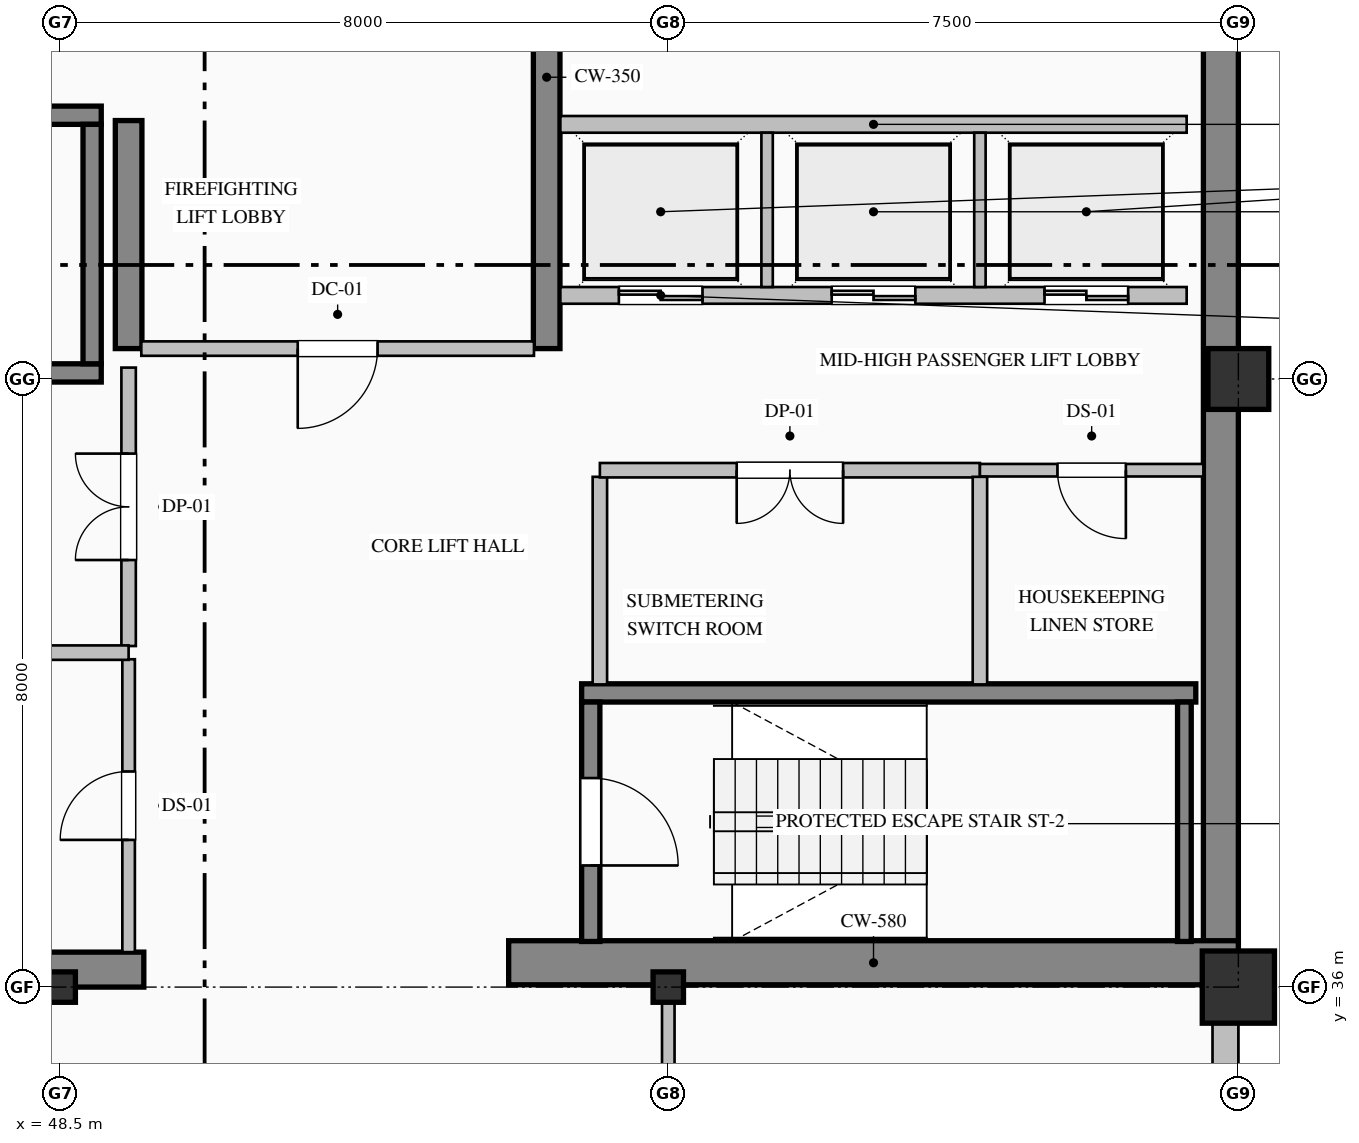
"""IFC4 building model, lengths in metres.
Left out: names, types, materials, properties, quantities, classifications, styles, units other than length and angle.
Written with IfcOpenShell. Run it as: python <this file> out.ifc"""

import sys

from ifc_helpers import new_model, si_unit, direction, frame, frame_2d, origin, origin_2d, place, context, subcontext, project, spatial, rectangle, hollow_rectangle, i_section, extrude, element, fill, save


model = new_model("IFC4")
c1 = context("Model", 3, precision=1e-05, world=origin(), true_north=direction((0.0, 1.0)))
c2 = subcontext(c1, "Body", "Model", "MODEL_VIEW")
j1 = project(units=[si_unit("LENGTHUNIT", "METRE"), si_unit("PLANEANGLEUNIT", "RADIAN")], contexts=[c1])
p1 = place(None, origin())
s1 = spatial("IfcSite", under=j1, at=p1, CompositionType="ELEMENT")
p2 = place(p1, origin())
s2 = spatial("IfcBuilding", under=s1, at=p2, CompositionType="ELEMENT")
p3 = place(p2, frame((0.0, 0.0, 261.8)))
s3 = spatial("IfcBuildingStorey", under=s2, at=p3, CompositionType="ELEMENT", Elevation=261.8)
p4 = place(p3, frame((63.77, 36.32, 0.0), z_axis=(0.0, 0.0, 1.0), x_axis=(0.0, 1.0, 0.0)))
e1 = element("IfcWall", 1, at=p4, inside=s3, PredefinedType="SHEAR", context=c2, shape_type="SweptSolid", body=[
    extrude(rectangle(XDim=15.22, YDim=0.46, at=frame_2d((7.61, 0.0))), origin(), (0.0, 0.0, 1.0), 3.775),
])
p5 = place(p3, frame((40.5, 36.23, 0.0), z_axis=(0.0, 0.0, 1.0), x_axis=(1.0, 0.0, 0.0)))
e2 = element("IfcWall", 2, at=p5, inside=s3, PredefinedType="SHEAR", context=c2, shape_type="SweptSolid", body=[
    extrude(rectangle(XDim=9.1, YDim=0.46, at=frame_2d((4.55, 0.0))), origin(), (0.0, 0.0, 1.0), 3.775),
])
p6 = place(p3, frame((54.4, 36.32, 0.0), z_axis=(0.0, 0.0, 1.0), x_axis=(1.0, 0.0, 0.0)))
e3 = element("IfcWall", 3, at=p6, inside=s3, PredefinedType="SHEAR", context=c2, shape_type="SweptSolid", body=[
    extrude(rectangle(XDim=9.6, YDim=0.58, at=frame_2d((4.8, 0.0))), origin(), (0.0, 0.0, 1.0), 4.0),
])
p7 = place(p3, frame((49.4, 44.4, 0.0), z_axis=(0.0, 0.0, 1.0), x_axis=(0.0, 1.0, 0.0)))
e4 = element("IfcWall", 4, at=p7, inside=s3, PredefinedType="SHEAR", context=c2, shape_type="SweptSolid", body=[
    extrude(rectangle(XDim=3.0, YDim=0.35, at=frame_2d((1.5, 0.0))), origin(), (0.0, 0.0, 1.0), 3.775),
])
p8 = place(p3, frame((54.9, 44.4, 0.0), z_axis=(0.0, 0.0, 1.0), x_axis=(0.0, 1.0, 0.0)))
e5 = element("IfcWall", 5, at=p8, inside=s3, PredefinedType="SHEAR", context=c2, shape_type="SweptSolid", body=[
    extrude(rectangle(XDim=7.14, YDim=0.35, at=frame_2d((3.57, 0.0))), origin(), (0.0, 0.0, 1.0), 3.775),
])
for number, where, z_axis, x_axis in (
    (6, (48.5, 36.0, 0.0), (0.0, 0.0, 1.0), (1.0, 0.0, 0.0)),
    (7, (56.5, 36.0, 0.0), (0.0, 0.0, 1.0), (1.0, 0.0, 0.0)),
):
    element("IfcColumn", number, at=place(p3, frame(where, z_axis=z_axis, x_axis=x_axis)), inside=s3, PredefinedType="COLUMN", context=c2, shape_type="SweptSolid", body=[
        extrude(i_section(OverallWidth=0.4, OverallDepth=0.4, WebThickness=0.013, FlangeThickness=0.021, FilletRadius=0.022, at=origin_2d()), origin(), (0.0, 0.0, 1.0), 4.0),
    ])
p9 = place(p3, frame((64.0, 36.0, 0.0), z_axis=(0.0, 0.0, 1.0), x_axis=(1.0, 0.0, 0.0)))
e8 = element("IfcColumn", 8, at=p9, inside=s3, PredefinedType="COLUMN", context=c2, shape_type="SweptSolid", body=[
    extrude(hollow_rectangle(XDim=0.95, YDim=0.95, WallThickness=0.036, at=origin_2d()), origin(), (0.0, 0.0, 1.0), 4.0),
])
p10 = place(p3, frame((64.0, 44.0, 0.0), z_axis=(0.0, 0.0, 1.0), x_axis=(1.0, 0.0, 0.0)))
e9 = element("IfcColumn", 9, at=p10, inside=s3, PredefinedType="COLUMN", context=c2, shape_type="SweptSolid", body=[
    extrude(hollow_rectangle(XDim=0.8, YDim=0.8, WallThickness=0.032, at=origin_2d()), origin(), (0.0, 0.0, 1.0), 4.0),
])
p11 = place(p3, frame((63.83, 36.05, 0.0), z_axis=(0.0, 0.0, 1.0), x_axis=(0.0, -1.0, 0.0)))
e10 = element("IfcWall", 10, at=p11, inside=s3, PredefinedType="SOLIDWALL", context=c2, shape_type="SweptSolid", body=[
    extrude(rectangle(XDim=19.55, YDim=0.34, at=frame_2d((9.775, 0.0))), origin(), (0.0, 0.0, 1.0), 3.325),
])
p12 = place(p11, frame((3.0, 0.0, 0.9)))
e11 = element("IfcOpeningElement", 11, at=p12, cuts=e10, PredefinedType="OPENING", context=c2, shape_type="SweptSolid", body=[
    extrude(rectangle(XDim=1.2, YDim=1.85, at=frame_2d((0.6, 0.925))), frame((0.0, 0.18, 0.0), z_axis=(0.0, -1.0, 0.0), x_axis=(1.0, 0.0, 0.0)), (0.0, 0.0, 1.0), 0.36),
])
p13 = place(p11, frame((10.05, 0.0, 0.7)))
e12 = element("IfcOpeningElement", 12, at=p13, cuts=e10, PredefinedType="OPENING", context=c2, shape_type="SweptSolid", body=[
    extrude(rectangle(XDim=1.5, YDim=2.4, at=frame_2d((0.75, 1.2))), frame((0.0, 0.18, 0.0), z_axis=(0.0, -1.0, 0.0), x_axis=(1.0, 0.0, 0.0)), (0.0, 0.0, 1.0), 0.36),
])
p14 = place(p11, frame((13.8, 0.0, 0.9)))
e13 = element("IfcOpeningElement", 13, at=p14, cuts=e10, PredefinedType="OPENING", context=c2, shape_type="SweptSolid", body=[
    extrude(rectangle(XDim=1.2, YDim=1.85, at=frame_2d((0.6, 0.925))), frame((0.0, 0.18, 0.0), z_axis=(0.0, -1.0, 0.0), x_axis=(1.0, 0.0, 0.0)), (0.0, 0.0, 1.0), 0.36),
])
for number, where, z_axis, x_axis in (
    (14, (40.96, 47.47, 0.0), (0.0, 0.0, 1.0), (1.0, 0.0, 0.0)),
    (15, (49.04, 44.08, 0.0), (0.0, 0.0, 1.0), (-1.0, 0.0, 0.0)),
):
    element("IfcWall", number, at=place(p3, frame(where, z_axis=z_axis, x_axis=x_axis)), inside=s3, PredefinedType="SOLIDWALL", context=c2, shape_type="SweptSolid", body=[
        extrude(rectangle(XDim=8.08, YDim=0.24, at=frame_2d((4.04, 0.0))), origin(), (0.0, 0.0, 1.0), 4.0),
    ])
p15 = place(p3, frame((48.92, 44.2, 0.0), z_axis=(0.0, 0.0, 1.0), x_axis=(0.0, 1.0, 0.0)))
e16 = element("IfcWall", 16, at=p15, inside=s3, PredefinedType="SOLIDWALL", context=c2, shape_type="SweptSolid", body=[
    extrude(rectangle(XDim=3.15, YDim=0.24, at=frame_2d((1.575, 0.0))), origin(), (0.0, 0.0, 1.0), 4.0),
])
p16 = place(p3, frame((55.36, 39.87, 0.0), z_axis=(0.0, 0.0, 1.0), x_axis=(1.0, 0.0, 0.0)))
e17 = element("IfcWall", 17, at=p16, inside=s3, PredefinedType="SOLIDWALL", context=c2, shape_type="SweptSolid", body=[
    extrude(rectangle(XDim=8.08, YDim=0.24, at=frame_2d((4.04, 0.0))), origin(), (0.0, 0.0, 1.0), 4.0),
])
p17 = place(p3, frame((55.48, 39.75, 0.0), z_axis=(0.0, 0.0, 1.0), x_axis=(0.0, -1.0, 0.0)))
e18 = element("IfcWall", 18, at=p17, inside=s3, PredefinedType="SOLIDWALL", context=c2, shape_type="SweptSolid", body=[
    extrude(rectangle(XDim=3.15, YDim=0.24, at=frame_2d((1.575, 0.0))), origin(), (0.0, 0.0, 1.0), 4.0),
])
p18 = place(p17, frame((1.0, 0.0, 0.0)))
e19 = element("IfcOpeningElement", 19, at=p18, cuts=e18, PredefinedType="OPENING", context=c2, shape_type="SweptSolid", body=[
    extrude(rectangle(XDim=1.15, YDim=2.2, at=frame_2d((0.575, 1.1))), frame((0.0, 0.13, 0.0), z_axis=(0.0, -1.0, 0.0), x_axis=(1.0, 0.0, 0.0)), (0.0, 0.0, 1.0), 0.26),
])
p19 = place(p3, frame((63.29, 36.6, 0.0), z_axis=(0.0, 0.0, 1.0), x_axis=(0.0, 1.0, 0.0)))
e20 = element("IfcWall", 20, at=p19, inside=s3, PredefinedType="SOLIDWALL", context=c2, shape_type="SweptSolid", body=[
    extrude(rectangle(XDim=3.15, YDim=0.18, at=frame_2d((1.575, 0.0))), origin(), (0.0, 0.0, 1.0), 4.0),
])
p20 = place(p3, frame((63.32, 45.1, 0.0), z_axis=(0.0, 0.0, 1.0), x_axis=(-1.0, 0.0, 0.0)))
e21 = element("IfcWall", 21, at=p20, inside=s3, PredefinedType="PARTITIONING", context=c2, shape_type="SweptSolid", body=[
    extrude(rectangle(XDim=8.24, YDim=0.22, at=frame_2d((4.12, 0.0))), origin(), (0.0, 0.0, 1.0), 3.775),
])
p21 = place(p20, frame((6.37, 0.0, 0.0)))
e22 = element("IfcOpeningElement", 22, at=p21, cuts=e21, PredefinedType="OPENING", context=c2, shape_type="SweptSolid", body=[
    extrude(rectangle(XDim=1.1, YDim=2.2, at=frame_2d((0.55, 1.1))), frame((0.0, 0.12, 0.0), z_axis=(0.0, -1.0, 0.0), x_axis=(1.0, 0.0, 0.0)), (0.0, 0.0, 1.0), 0.24),
])
p22 = place(p20, frame((3.57, 0.0, 0.0)))
e23 = element("IfcOpeningElement", 23, at=p22, cuts=e21, PredefinedType="OPENING", context=c2, shape_type="SweptSolid", body=[
    extrude(rectangle(XDim=1.1, YDim=2.2, at=frame_2d((0.55, 1.1))), frame((0.0, 0.12, 0.0), z_axis=(0.0, -1.0, 0.0), x_axis=(1.0, 0.0, 0.0)), (0.0, 0.0, 1.0), 0.24),
])
p23 = place(p20, frame((0.77, 0.0, 0.0)))
e24 = element("IfcOpeningElement", 24, at=p23, cuts=e21, PredefinedType="OPENING", context=c2, shape_type="SweptSolid", body=[
    extrude(rectangle(XDim=1.1, YDim=2.2, at=frame_2d((0.55, 1.1))), frame((0.0, 0.12, 0.0), z_axis=(0.0, -1.0, 0.0), x_axis=(1.0, 0.0, 0.0)), (0.0, 0.0, 1.0), 0.24),
])
p24 = place(p3, frame((55.08, 47.35, 0.0), z_axis=(0.0, 0.0, 1.0), x_axis=(1.0, 0.0, 0.0)))
e25 = element("IfcWall", 25, at=p24, inside=s3, PredefinedType="PARTITIONING", context=c2, shape_type="SweptSolid", body=[
    extrude(rectangle(XDim=8.24, YDim=0.22, at=frame_2d((4.12, 0.0))), origin(), (0.0, 0.0, 1.0), 3.775),
])
for number, where, z_axis, x_axis in (
    (26, (57.8, 45.21, 0.0), (0.0, 0.0, 1.0), (0.0, 1.0, 0.0)),
    (27, (60.6, 45.21, 0.0), (0.0, 0.0, 1.0), (0.0, 1.0, 0.0)),
):
    element("IfcWall", number, at=place(p3, frame(where, z_axis=z_axis, x_axis=x_axis)), inside=s3, PredefinedType="PARTITIONING", context=c2, shape_type="SweptSolid", body=[
        extrude(rectangle(XDim=2.03, YDim=0.15, at=frame_2d((1.015, 0.0))), origin(), (0.0, 0.0, 1.0), 3.775),
    ])
p25 = place(p3, frame((54.733, 44.4, 0.0), z_axis=(0.0, 0.0, 1.0), x_axis=(-1.0, 0.0, 0.0)))
e28 = element("IfcWall", 28, at=p25, inside=s3, PredefinedType="PARTITIONING", context=c2, shape_type="SweptSolid", body=[
    extrude(rectangle(XDim=5.166, YDim=0.19, at=frame_2d((2.583, 0.0))), origin(), (0.0, 0.0, 1.0), 3.775),
])
p26 = place(p25, frame((2.058, 0.0, 0.0)))
e29 = element("IfcOpeningElement", 29, at=p26, cuts=e28, PredefinedType="OPENING", context=c2, shape_type="SweptSolid", body=[
    extrude(rectangle(XDim=1.05, YDim=2.15, at=frame_2d((0.525, 1.075))), frame((0.0, 0.105, 0.0), z_axis=(0.0, -1.0, 0.0), x_axis=(1.0, 0.0, 0.0)), (0.0, 0.0, 1.0), 0.21),
])
p27 = place(p3, frame((49.4, 36.46, 0.0), z_axis=(0.0, 0.0, 1.0), x_axis=(0.0, 1.0, 0.0)))
e30 = element("IfcWall", 30, at=p27, inside=s3, PredefinedType="PARTITIONING", context=c2, shape_type="SweptSolid", body=[
    extrude(rectangle(XDim=3.853, YDim=0.165, at=frame_2d((1.927, 0.0))), origin(), (0.0, 0.0, 1.0), 3.017),
])
p28 = place(p27, frame((1.477, 0.0, 0.0)))
e31 = element("IfcOpeningElement", 31, at=p28, cuts=e30, PredefinedType="OPENING", context=c2, shape_type="SweptSolid", body=[
    extrude(rectangle(XDim=0.9, YDim=2.15, at=frame_2d((0.45, 1.075))), frame((0.0, 0.093, 0.0), z_axis=(0.0, -1.0, 0.0), x_axis=(1.0, 0.0, 0.0)), (0.0, 0.0, 1.0), 0.185),
])
p29 = place(p3, frame((49.4, 40.487, 0.0), z_axis=(0.0, 0.0, 1.0), x_axis=(0.0, 1.0, 0.0)))
e32 = element("IfcWall", 32, at=p29, inside=s3, PredefinedType="PARTITIONING", context=c2, shape_type="SweptSolid", body=[
    extrude(rectangle(XDim=3.663, YDim=0.19, at=frame_2d((1.832, 0.0))), origin(), (0.0, 0.0, 1.0), 3.017),
])
p30 = place(p29, frame((1.132, 0.0, 0.0)))
e33 = element("IfcOpeningElement", 33, at=p30, cuts=e32, PredefinedType="OPENING", context=c2, shape_type="SweptSolid", body=[
    extrude(rectangle(XDim=1.4, YDim=2.25, at=frame_2d((0.7, 1.125))), frame((0.0, 0.105, 0.0), z_axis=(0.0, -1.0, 0.0), x_axis=(1.0, 0.0, 0.0)), (0.0, 0.0, 1.0), 0.21),
])
p31 = place(p3, frame((55.6, 42.713, 0.0), z_axis=(0.0, 0.0, 1.0), x_axis=(0.0, -1.0, 0.0)))
e34 = element("IfcWall", 34, at=p31, inside=s3, PredefinedType="PARTITIONING", context=c2, shape_type="SweptSolid", body=[
    extrude(rectangle(XDim=2.731, YDim=0.19, at=frame_2d((1.365, 0.0))), origin(), (0.0, 0.0, 1.0), 3.775),
])
p32 = place(p3, frame((40.96, 40.4, 0.0), z_axis=(0.0, 0.0, 1.0), x_axis=(1.0, 0.0, 0.0)))
e35 = element("IfcWall", 35, at=p32, inside=s3, PredefinedType="PARTITIONING", context=c2, shape_type="SweptSolid", body=[
    extrude(rectangle(XDim=8.44, YDim=0.19, at=frame_2d((4.22, 0.0))), origin(), (0.0, 0.0, 1.0), 3.775),
])
p33 = place(p3, frame((60.6, 42.8, 0.0), z_axis=(0.0, 0.0, 1.0), x_axis=(-1.0, 0.0, 0.0)))
e36 = element("IfcWall", 36, at=p33, inside=s3, PredefinedType="PARTITIONING", context=c2, shape_type="SweptSolid", body=[
    extrude(rectangle(XDim=5.0, YDim=0.19, at=frame_2d((2.5, 0.0))), origin(), (0.0, 0.0, 1.0), 3.775),
])
p34 = place(p33, frame((1.8, 0.0, 0.0)))
e37 = element("IfcOpeningElement", 37, at=p34, cuts=e36, PredefinedType="OPENING", context=c2, shape_type="SweptSolid", body=[
    extrude(rectangle(XDim=1.4, YDim=2.25, at=frame_2d((0.7, 1.125))), frame((0.0, 0.105, 0.0), z_axis=(0.0, -1.0, 0.0), x_axis=(1.0, 0.0, 0.0)), (0.0, 0.0, 1.0), 0.21),
])
p35 = place(p3, frame((63.54, 42.8, 0.0), z_axis=(0.0, 0.0, 1.0), x_axis=(-1.0, 0.0, 0.0)))
e38 = element("IfcWall", 38, at=p35, inside=s3, PredefinedType="PARTITIONING", context=c2, shape_type="SweptSolid", body=[
    extrude(rectangle(XDim=2.94, YDim=0.165, at=frame_2d((1.47, 0.0))), origin(), (0.0, 0.0, 1.0), 3.775),
])
p36 = place(p35, frame((1.02, 0.0, 0.0)))
e39 = element("IfcOpeningElement", 39, at=p36, cuts=e38, PredefinedType="OPENING", context=c2, shape_type="SweptSolid", body=[
    extrude(rectangle(XDim=0.9, YDim=2.15, at=frame_2d((0.45, 1.075))), frame((0.0, 0.093, 0.0), z_axis=(0.0, -1.0, 0.0), x_axis=(1.0, 0.0, 0.0)), (0.0, 0.0, 1.0), 0.185),
])
p37 = place(p3, frame((60.6, 42.713, 0.0), z_axis=(0.0, 0.0, 1.0), x_axis=(0.0, -1.0, 0.0)))
e40 = element("IfcWall", 40, at=p37, inside=s3, PredefinedType="PARTITIONING", context=c2, shape_type="SweptSolid", body=[
    extrude(rectangle(XDim=2.731, YDim=0.19, at=frame_2d((1.365, 0.0))), origin(), (0.0, 0.0, 1.0), 3.775),
])
p38 = place(p3, frame((56.5, 36.0, 0.0), z_axis=(0.0, 0.0, 1.0), x_axis=(0.0, -1.0, 0.0)))
e41 = element("IfcWall", 41, at=p38, inside=s3, PredefinedType="PARTITIONING", context=c2, shape_type="SweptSolid", body=[
    extrude(rectangle(XDim=5.525, YDim=0.165, at=frame_2d((2.763, 0.0))), origin(), (0.0, 0.0, 1.0), 3.179),
])
p39 = place(p38, frame((2.263, 0.0, 0.0)))
e42 = element("IfcOpeningElement", 42, at=p39, cuts=e41, PredefinedType="OPENING", context=c2, shape_type="SweptSolid", body=[
    extrude(rectangle(XDim=1.0, YDim=2.15, at=frame_2d((0.5, 1.075))), frame((0.0, 0.093, 0.0), z_axis=(0.0, -1.0, 0.0), x_axis=(1.0, 0.0, 0.0)), (0.0, 0.0, 1.0), 0.185),
])
p40 = place(p18, origin())
e43 = element("IfcDoor", 43, at=p40, inside=s3, OperationType="SINGLE_SWING_RIGHT", PredefinedType="DOOR", context=c2, shape_type="SweptSolid", body=[
    extrude(rectangle(XDim=1.15, YDim=2.2, at=frame_2d((0.575, 1.1))), frame((0.0, 0.025, 0.0), z_axis=(0.0, -1.0, 0.0), x_axis=(1.0, 0.0, 0.0)), (0.0, 0.0, 1.0), 0.05),
])
fill(e19, e43)
p41 = place(p21, origin())
e44 = element("IfcDoor", 44, at=p41, inside=s3, OperationType="DOUBLE_DOOR_SLIDING", PredefinedType="DOOR", context=c2, shape_type="SweptSolid", body=[
    extrude(rectangle(XDim=1.1, YDim=2.2, at=frame_2d((0.55, 1.1))), frame((0.0, 0.025, 0.0), z_axis=(0.0, -1.0, 0.0), x_axis=(1.0, 0.0, 0.0)), (0.0, 0.0, 1.0), 0.05),
])
fill(e22, e44)
p42 = place(p22, origin())
e45 = element("IfcDoor", 45, at=p42, inside=s3, OperationType="DOUBLE_DOOR_SLIDING", PredefinedType="DOOR", context=c2, shape_type="SweptSolid", body=[
    extrude(rectangle(XDim=1.1, YDim=2.2, at=frame_2d((0.55, 1.1))), frame((0.0, 0.025, 0.0), z_axis=(0.0, -1.0, 0.0), x_axis=(1.0, 0.0, 0.0)), (0.0, 0.0, 1.0), 0.05),
])
fill(e23, e45)
p43 = place(p23, origin())
e46 = element("IfcDoor", 46, at=p43, inside=s3, OperationType="DOUBLE_DOOR_SLIDING", PredefinedType="DOOR", context=c2, shape_type="SweptSolid", body=[
    extrude(rectangle(XDim=1.1, YDim=2.2, at=frame_2d((0.55, 1.1))), frame((0.0, 0.025, 0.0), z_axis=(0.0, -1.0, 0.0), x_axis=(1.0, 0.0, 0.0)), (0.0, 0.0, 1.0), 0.05),
])
fill(e24, e46)
p44 = place(p26, origin())
e47 = element("IfcDoor", 47, at=p44, inside=s3, OperationType="SINGLE_SWING_RIGHT", PredefinedType="DOOR", context=c2, shape_type="SweptSolid", body=[
    extrude(rectangle(XDim=1.05, YDim=2.15, at=frame_2d((0.525, 1.075))), frame((0.0, 0.025, 0.0), z_axis=(0.0, -1.0, 0.0), x_axis=(1.0, 0.0, 0.0)), (0.0, 0.0, 1.0), 0.05),
])
fill(e29, e47)
p45 = place(p28, origin())
e48 = element("IfcDoor", 48, at=p45, inside=s3, OperationType="SINGLE_SWING_LEFT", PredefinedType="DOOR", context=c2, shape_type="SweptSolid", body=[
    extrude(rectangle(XDim=0.9, YDim=2.15, at=frame_2d((0.45, 1.075))), frame((0.0, 0.025, 0.0), z_axis=(0.0, -1.0, 0.0), x_axis=(1.0, 0.0, 0.0)), (0.0, 0.0, 1.0), 0.05),
])
fill(e31, e48)
p46 = place(p30, origin())
e49 = element("IfcDoor", 49, at=p46, inside=s3, OperationType="DOUBLE_DOOR_SINGLE_SWING", PredefinedType="DOOR", context=c2, shape_type="SweptSolid", body=[
    extrude(rectangle(XDim=1.4, YDim=2.25, at=frame_2d((0.7, 1.125))), frame((0.0, 0.025, 0.0), z_axis=(0.0, -1.0, 0.0), x_axis=(1.0, 0.0, 0.0)), (0.0, 0.0, 1.0), 0.05),
])
fill(e33, e49)
p47 = place(p34, origin())
e50 = element("IfcDoor", 50, at=p47, inside=s3, OperationType="DOUBLE_DOOR_SINGLE_SWING", PredefinedType="DOOR", context=c2, shape_type="SweptSolid", body=[
    extrude(rectangle(XDim=1.4, YDim=2.25, at=frame_2d((0.7, 1.125))), frame((0.0, 0.025, 0.0), z_axis=(0.0, -1.0, 0.0), x_axis=(1.0, 0.0, 0.0)), (0.0, 0.0, 1.0), 0.05),
])
fill(e37, e50)
p48 = place(p36, origin())
e51 = element("IfcDoor", 51, at=p48, inside=s3, OperationType="SINGLE_SWING_LEFT", PredefinedType="DOOR", context=c2, shape_type="SweptSolid", body=[
    extrude(rectangle(XDim=0.9, YDim=2.15, at=frame_2d((0.45, 1.075))), frame((0.0, 0.025, 0.0), z_axis=(0.0, -1.0, 0.0), x_axis=(1.0, 0.0, 0.0)), (0.0, 0.0, 1.0), 0.05),
])
fill(e39, e51)
save(model, sys.argv[1])
